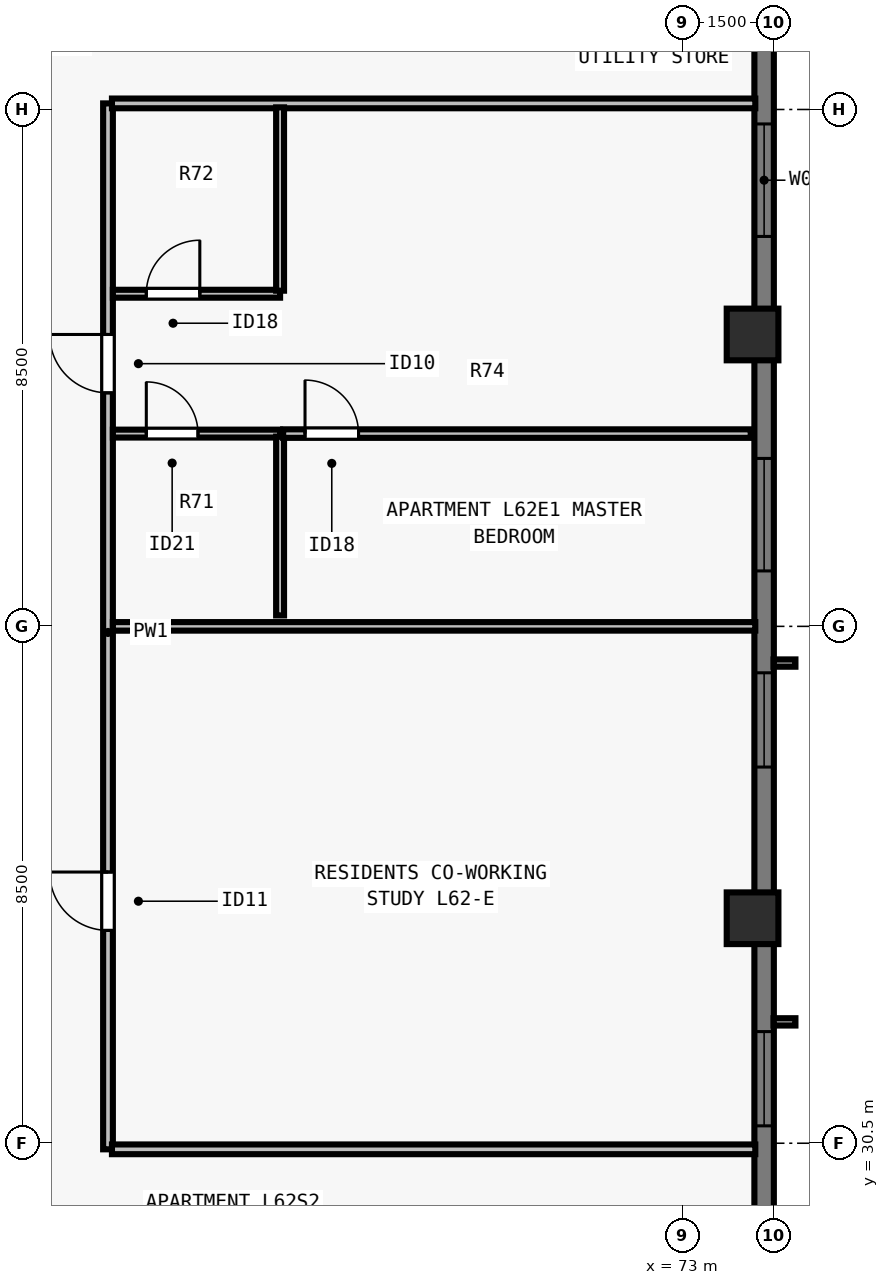
"""IFC4 building model, lengths in metres.
Left out: names, types, materials, properties, quantities, classifications, styles, units other than length and angle.
Written with IfcOpenShell. Run it as: python <this file> out.ifc"""

import sys

from ifc_helpers import new_model, si_unit, direction, frame, frame_2d, origin, origin_2d, place, context, subcontext, project, spatial, rectangle, extrude, element, fill, save


model = new_model("IFC4")
c1 = context("Model", 3, precision=1e-05, world=origin(), true_north=direction((0.0, 1.0)))
c2 = subcontext(c1, "Body", "Model", "MODEL_VIEW")
j1 = project(units=[si_unit("LENGTHUNIT", "METRE"), si_unit("PLANEANGLEUNIT", "RADIAN")], contexts=[c1])
p1 = place(None, origin())
s1 = spatial("IfcSite", under=j1, at=p1, CompositionType="ELEMENT")
p2 = place(p1, origin())
s2 = spatial("IfcBuilding", under=s1, at=p2, CompositionType="ELEMENT")
p3 = place(p2, frame((0.0, 0.0, 227.0)))
s3 = spatial("IfcBuildingStorey", under=s2, at=p3, CompositionType="ELEMENT", Elevation=227.0)
for number, where, z_axis, x_axis in (
    (1, (74.15, 34.2, 0.0), (0.0, 0.0, 1.0), (0.0, 1.0, 0.0)),
    (2, (74.15, 43.8, 0.0), (0.0, 0.0, 1.0), (0.0, 1.0, 0.0)),
):
    element("IfcColumn", number, at=place(p3, frame(where, z_axis=z_axis, x_axis=x_axis)), inside=s3, PredefinedType="COLUMN", context=c2, shape_type="SweptSolid", body=[
        extrude(rectangle(XDim=0.85, YDim=0.85, at=origin_2d()), origin(), (0.0, 0.0, 1.0), 3.5),
    ])
p4 = place(p3, frame((74.34, 56.5, 0.0), z_axis=(0.0, 0.0, 1.0), x_axis=(0.0, -1.0, 0.0)))
e3 = element("IfcWall", 3, at=p4, inside=s3, PredefinedType="SOLIDWALL", context=c2, shape_type="SweptSolid", body=[
    extrude(rectangle(XDim=34.702, YDim=0.32, at=frame_2d((17.351, 0.0))), origin(), (0.0, 0.0, 1.0), 3.29),
])
p5 = place(p4, frame((4.763, 0.0, 0.8)))
e4 = element("IfcOpeningElement", 4, at=p5, cuts=e3, PredefinedType="OPENING", context=c2, shape_type="SweptSolid", body=[
    extrude(rectangle(XDim=1.55, YDim=1.678, at=frame_2d((0.775, 0.839))), frame((0.0, 0.17, 0.0), z_axis=(0.0, -1.0, 0.0), x_axis=(1.0, 0.0, 0.0)), (0.0, 0.0, 1.0), 0.34),
])
p6 = place(p4, frame((9.238, 0.0, 0.8)))
e5 = element("IfcOpeningElement", 5, at=p6, cuts=e3, PredefinedType="OPENING", context=c2, shape_type="SweptSolid", body=[
    extrude(rectangle(XDim=1.85, YDim=1.678, at=frame_2d((0.925, 0.839))), frame((0.0, 0.17, 0.0), z_axis=(0.0, -1.0, 0.0), x_axis=(1.0, 0.0, 0.0)), (0.0, 0.0, 1.0), 0.34),
])
p7 = place(p4, frame((14.738, 0.0, 0.8)))
e6 = element("IfcOpeningElement", 6, at=p7, cuts=e3, PredefinedType="OPENING", context=c2, shape_type="SweptSolid", body=[
    extrude(rectangle(XDim=1.85, YDim=1.678, at=frame_2d((0.925, 0.839))), frame((0.0, 0.17, 0.0), z_axis=(0.0, -1.0, 0.0), x_axis=(1.0, 0.0, 0.0)), (0.0, 0.0, 1.0), 0.34),
])
p8 = place(p4, frame((18.264, 0.0, 0.8)))
e7 = element("IfcOpeningElement", 7, at=p8, cuts=e3, PredefinedType="OPENING", context=c2, shape_type="SweptSolid", body=[
    extrude(rectangle(XDim=1.55, YDim=1.678, at=frame_2d((0.775, 0.839))), frame((0.0, 0.17, 0.0), z_axis=(0.0, -1.0, 0.0), x_axis=(1.0, 0.0, 0.0)), (0.0, 0.0, 1.0), 0.34),
])
p9 = place(p4, frame((24.164, 0.0, 0.8)))
e8 = element("IfcOpeningElement", 8, at=p9, cuts=e3, PredefinedType="OPENING", context=c2, shape_type="SweptSolid", body=[
    extrude(rectangle(XDim=1.55, YDim=1.678, at=frame_2d((0.775, 0.839))), frame((0.0, 0.17, 0.0), z_axis=(0.0, -1.0, 0.0), x_axis=(1.0, 0.0, 0.0)), (0.0, 0.0, 1.0), 0.34),
])
p10 = place(p4, frame((28.689, 0.0, 0.8)))
e9 = element("IfcOpeningElement", 9, at=p10, cuts=e3, PredefinedType="OPENING", context=c2, shape_type="SweptSolid", body=[
    extrude(rectangle(XDim=1.85, YDim=1.678, at=frame_2d((0.925, 0.839))), frame((0.0, 0.17, 0.0), z_axis=(0.0, -1.0, 0.0), x_axis=(1.0, 0.0, 0.0)), (0.0, 0.0, 1.0), 0.34),
])
p11 = place(p4, frame((31.35, 0.0, 0.8)))
e10 = element("IfcOpeningElement", 10, at=p11, cuts=e3, PredefinedType="OPENING", context=c2, shape_type="SweptSolid", body=[
    extrude(rectangle(XDim=0.9, YDim=1.678, at=frame_2d((0.45, 0.839))), frame((0.0, 0.17, 0.0), z_axis=(0.0, -1.0, 0.0), x_axis=(1.0, 0.0, 0.0)), (0.0, 0.0, 1.0), 0.34),
])
p12 = place(p3, frame((63.55, 30.4, 0.0), z_axis=(0.0, 0.0, 1.0), x_axis=(0.0, 1.0, 0.0)))
e11 = element("IfcWall", 11, at=p12, inside=s3, PredefinedType="PARTITIONING", context=c2, shape_type="SweptSolid", body=[
    extrude(rectangle(XDim=17.2, YDim=0.16, at=frame_2d((8.6, 0.0))), origin(), (0.0, 0.0, 1.0), 3.29),
])
p13 = place(p12, frame((3.6, 0.0, 0.0)))
e12 = element("IfcOpeningElement", 12, at=p13, cuts=e11, PredefinedType="OPENING", context=c2, shape_type="SweptSolid", body=[
    extrude(rectangle(XDim=0.96, YDim=2.12, at=frame_2d((0.48, 1.06))), frame((0.0, 0.09, 0.0), z_axis=(0.0, -1.0, 0.0), x_axis=(1.0, 0.0, 0.0)), (0.0, 0.0, 1.0), 0.18),
])
p14 = place(p12, frame((12.44, 0.0, 0.0)))
e13 = element("IfcOpeningElement", 13, at=p14, cuts=e11, PredefinedType="OPENING", context=c2, shape_type="SweptSolid", body=[
    extrude(rectangle(XDim=0.96, YDim=2.18, at=frame_2d((0.48, 1.09))), frame((0.0, 0.09, 0.0), z_axis=(0.0, -1.0, 0.0), x_axis=(1.0, 0.0, 0.0)), (0.0, 0.0, 1.0), 0.18),
])
for number, where, z_axis, x_axis in (
    (14, (63.615, 30.4, 0.0), (0.0, 0.0, 1.0), (1.0, 0.0, 0.0)),
    (15, (63.615, 47.6, 0.0), (0.0, 0.0, 1.0), (1.0, 0.0, 0.0)),
):
    element("IfcWall", number, at=place(p3, frame(where, z_axis=z_axis, x_axis=x_axis)), inside=s3, PredefinedType="PARTITIONING", context=c2, shape_type="SweptSolid", body=[
        extrude(rectangle(XDim=10.58, YDim=0.16, at=frame_2d((5.29, 0.0))), origin(), (0.0, 0.0, 1.0), 3.29),
    ])
p15 = place(p3, frame((63.63, 39.0, 0.0), z_axis=(0.0, 0.0, 1.0), x_axis=(1.0, 0.0, 0.0)))
e16 = element("IfcWall", 16, at=p15, inside=s3, PredefinedType="PARTITIONING", context=c2, shape_type="SweptSolid", body=[
    extrude(rectangle(XDim=10.565, YDim=0.14, at=frame_2d((5.283, 0.0))), origin(), (0.0, 0.0, 1.0), 3.29),
])
p16 = place(p3, frame((63.63, 42.17, 0.0), z_axis=(0.0, 0.0, 1.0), x_axis=(1.0, 0.0, 0.0)))
e17 = element("IfcWall", 17, at=p16, inside=s3, PredefinedType="PLUMBINGWALL", context=c2, shape_type="SweptSolid", body=[
    extrude(rectangle(XDim=2.75, YDim=0.13, at=frame_2d((1.375, 0.0))), origin(), (0.0, 0.0, 1.0), 3.29),
])
p17 = place(p16, frame((0.55, 0.0, 0.0)))
e18 = element("IfcOpeningElement", 18, at=p17, cuts=e17, PredefinedType="OPENING", context=c2, shape_type="SweptSolid", body=[
    extrude(rectangle(XDim=0.85, YDim=2.08, at=frame_2d((0.425, 1.04))), frame((0.0, 0.075, 0.0), z_axis=(0.0, -1.0, 0.0), x_axis=(1.0, 0.0, 0.0)), (0.0, 0.0, 1.0), 0.15),
])
p18 = place(p3, frame((66.38, 39.18, 0.0), z_axis=(0.0, 0.0, 1.0), x_axis=(0.0, 1.0, 0.0)))
e19 = element("IfcWall", 19, at=p18, inside=s3, PredefinedType="PLUMBINGWALL", context=c2, shape_type="SweptSolid", body=[
    extrude(rectangle(XDim=2.94, YDim=0.13, at=frame_2d((1.47, 0.0))), origin(), (0.0, 0.0, 1.0), 3.29),
])
p19 = place(p3, frame((63.63, 44.47, 0.0), z_axis=(0.0, 0.0, 1.0), x_axis=(1.0, 0.0, 0.0)))
e20 = element("IfcWall", 20, at=p19, inside=s3, PredefinedType="PLUMBINGWALL", context=c2, shape_type="SweptSolid", body=[
    extrude(rectangle(XDim=2.75, YDim=0.13, at=frame_2d((1.375, 0.0))), origin(), (0.0, 0.0, 1.0), 3.29),
])
p20 = place(p19, frame((0.55, 0.0, 0.0)))
e21 = element("IfcOpeningElement", 21, at=p20, cuts=e20, PredefinedType="OPENING", context=c2, shape_type="SweptSolid", body=[
    extrude(rectangle(XDim=0.88, YDim=2.1, at=frame_2d((0.44, 1.05))), frame((0.0, 0.075, 0.0), z_axis=(0.0, -1.0, 0.0), x_axis=(1.0, 0.0, 0.0)), (0.0, 0.0, 1.0), 0.15),
])
p21 = place(p3, frame((66.38, 44.52, 0.0), z_axis=(0.0, 0.0, 1.0), x_axis=(0.0, 1.0, 0.0)))
e22 = element("IfcWall", 22, at=p21, inside=s3, PredefinedType="PLUMBINGWALL", context=c2, shape_type="SweptSolid", body=[
    extrude(rectangle(XDim=3.015, YDim=0.13, at=frame_2d((1.507, 0.0))), origin(), (0.0, 0.0, 1.0), 3.29),
])
p22 = place(p3, frame((66.43, 42.17, 0.0), z_axis=(0.0, 0.0, 1.0), x_axis=(1.0, 0.0, 0.0)))
e23 = element("IfcWall", 23, at=p22, inside=s3, PredefinedType="PARTITIONING", context=c2, shape_type="SweptSolid", body=[
    extrude(rectangle(XDim=7.69, YDim=0.14, at=frame_2d((3.845, 0.0))), origin(), (0.0, 0.0, 1.0), 3.29),
])
p23 = place(p22, frame((0.36, 0.0, 0.0)))
e24 = element("IfcOpeningElement", 24, at=p23, cuts=e23, PredefinedType="OPENING", context=c2, shape_type="SweptSolid", body=[
    extrude(rectangle(XDim=0.88, YDim=2.1, at=frame_2d((0.44, 1.05))), frame((0.0, 0.08, 0.0), z_axis=(0.0, -1.0, 0.0), x_axis=(1.0, 0.0, 0.0)), (0.0, 0.0, 1.0), 0.16),
])
p24 = place(p6, origin())
e25 = element("IfcWindow", 25, at=p24, inside=s3, PartitioningType="SINGLE_PANEL", PredefinedType="WINDOW", context=c2, shape_type="SweptSolid", body=[
    extrude(rectangle(XDim=1.85, YDim=1.678, at=frame_2d((0.925, 0.839))), frame((0.0, -0.05, 0.0), z_axis=(0.0, -1.0, 0.0), x_axis=(1.0, 0.0, 0.0)), (0.0, 0.0, 1.0), 0.06),
])
fill(e5, e25)
p25 = place(p7, origin())
e26 = element("IfcWindow", 26, at=p25, inside=s3, PartitioningType="SINGLE_PANEL", PredefinedType="WINDOW", context=c2, shape_type="SweptSolid", body=[
    extrude(rectangle(XDim=1.85, YDim=1.678, at=frame_2d((0.925, 0.839))), frame((0.0, -0.05, 0.0), z_axis=(0.0, -1.0, 0.0), x_axis=(1.0, 0.0, 0.0)), (0.0, 0.0, 1.0), 0.06),
])
fill(e6, e26)
p26 = place(p8, origin())
e27 = element("IfcWindow", 27, at=p26, inside=s3, PartitioningType="SINGLE_PANEL", PredefinedType="WINDOW", context=c2, shape_type="SweptSolid", body=[
    extrude(rectangle(XDim=1.55, YDim=1.678, at=frame_2d((0.775, 0.839))), frame((0.0, -0.05, 0.0), z_axis=(0.0, -1.0, 0.0), x_axis=(1.0, 0.0, 0.0)), (0.0, 0.0, 1.0), 0.06),
])
fill(e7, e27)
p27 = place(p9, origin())
e28 = element("IfcWindow", 28, at=p27, inside=s3, PartitioningType="SINGLE_PANEL", PredefinedType="WINDOW", context=c2, shape_type="SweptSolid", body=[
    extrude(rectangle(XDim=1.55, YDim=1.678, at=frame_2d((0.775, 0.839))), frame((0.0, -0.05, 0.0), z_axis=(0.0, -1.0, 0.0), x_axis=(1.0, 0.0, 0.0)), (0.0, 0.0, 1.0), 0.06),
])
fill(e8, e28)
p28 = place(p13, origin())
e29 = element("IfcDoor", 29, at=p28, inside=s3, OperationType="SINGLE_SWING_RIGHT", PredefinedType="DOOR", context=c2, shape_type="SweptSolid", body=[
    extrude(rectangle(XDim=0.96, YDim=2.12, at=frame_2d((0.48, 1.06))), frame((0.0, 0.025, 0.0), z_axis=(0.0, -1.0, 0.0), x_axis=(1.0, 0.0, 0.0)), (0.0, 0.0, 1.0), 0.05),
])
fill(e12, e29)
p29 = place(p17, origin())
e30 = element("IfcDoor", 30, at=p29, inside=s3, OperationType="SINGLE_SWING_LEFT", PredefinedType="DOOR", context=c2, shape_type="SweptSolid", body=[
    extrude(rectangle(XDim=0.85, YDim=2.08, at=frame_2d((0.425, 1.04))), frame((0.0, 0.025, 0.0), z_axis=(0.0, -1.0, 0.0), x_axis=(1.0, 0.0, 0.0)), (0.0, 0.0, 1.0), 0.05),
])
fill(e18, e30)
p30 = place(p20, origin())
e31 = element("IfcDoor", 31, at=p30, inside=s3, OperationType="SINGLE_SWING_RIGHT", PredefinedType="DOOR", context=c2, shape_type="SweptSolid", body=[
    extrude(rectangle(XDim=0.88, YDim=2.1, at=frame_2d((0.44, 1.05))), frame((0.0, 0.025, 0.0), z_axis=(0.0, -1.0, 0.0), x_axis=(1.0, 0.0, 0.0)), (0.0, 0.0, 1.0), 0.05),
])
fill(e21, e31)
p31 = place(p23, origin())
e32 = element("IfcDoor", 32, at=p31, inside=s3, OperationType="SINGLE_SWING_LEFT", PredefinedType="DOOR", context=c2, shape_type="SweptSolid", body=[
    extrude(rectangle(XDim=0.88, YDim=2.1, at=frame_2d((0.44, 1.05))), frame((0.0, 0.025, 0.0), z_axis=(0.0, -1.0, 0.0), x_axis=(1.0, 0.0, 0.0)), (0.0, 0.0, 1.0), 0.05),
])
fill(e24, e32)
p32 = place(p14, origin())
e33 = element("IfcDoor", 33, at=p32, inside=s3, OperationType="SINGLE_SWING_RIGHT", PredefinedType="DOOR", context=c2, shape_type="SweptSolid", body=[
    extrude(rectangle(XDim=0.96, YDim=2.18, at=frame_2d((0.48, 1.09))), frame((0.0, 0.025, 0.0), z_axis=(0.0, -1.0, 0.0), x_axis=(1.0, 0.0, 0.0)), (0.0, 0.0, 1.0), 0.05),
])
fill(e13, e33)
save(model, sys.argv[1])
